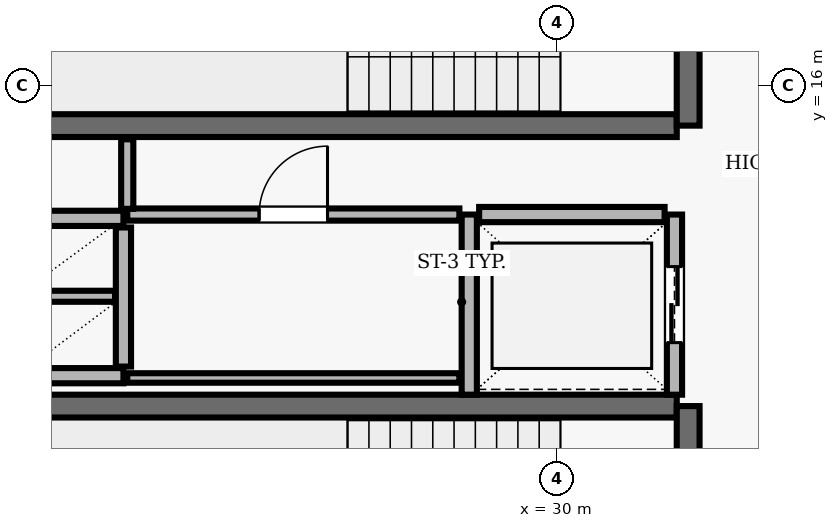
"""IFC4 building model, lengths in metres.
Left out: names, types, materials, properties, quantities, classifications, styles, units other than length and angle.
Written with IfcOpenShell. Run it as: python <this file> out.ifc"""

import sys

from ifc_helpers import new_model, si_unit, direction, frame, frame_2d, origin, place, context, subcontext, project, spatial, rectangle, extrude, element, fill, save


model = new_model("IFC4")
c1 = context("Model", 3, precision=1e-05, world=origin(), true_north=direction((0.0, 1.0)))
c2 = subcontext(c1, "Body", "Model", "MODEL_VIEW")
j1 = project(units=[si_unit("LENGTHUNIT", "METRE"), si_unit("PLANEANGLEUNIT", "RADIAN")], contexts=[c1])
p1 = place(None, origin())
s1 = spatial("IfcSite", under=j1, at=p1, CompositionType="ELEMENT")
p2 = place(p1, origin())
s2 = spatial("IfcBuilding", under=s1, at=p2, CompositionType="ELEMENT")
p3 = place(p2, frame((0.0, 0.0, 207.0)))
s3 = spatial("IfcBuildingStorey", under=s2, at=p3, CompositionType="ELEMENT", Elevation=207.0)
p4 = place(p3, frame((23.22, 15.47, 0.0), z_axis=(0.0, 0.0, 1.0), x_axis=(1.0, 0.0, 0.0)))
e1 = element("IfcWall", 1, at=p4, inside=s3, PredefinedType="SHEAR", context=c2, shape_type="SweptSolid", body=[
    extrude(rectangle(XDim=8.36, YDim=0.3, at=frame_2d((4.18, 0.0))), origin(), (0.0, 0.0, 1.0), 3.69),
])
p5 = place(p3, frame((31.73, 15.47, 0.0), z_axis=(0.0, 0.0, 1.0), x_axis=(0.0, 1.0, 0.0)))
e2 = element("IfcWall", 2, at=p5, inside=s3, PredefinedType="SHEAR", context=c2, shape_type="SweptSolid", body=[
    extrude(rectangle(XDim=3.51, YDim=0.3, at=frame_2d((1.755, 0.0))), origin(), (0.0, 0.0, 1.0), 3.69),
])
p6 = place(p5, frame((1.18, 0.0, 0.0)))
e3 = element("IfcOpeningElement", 3, at=p6, cuts=e2, PredefinedType="OPENING", context=c2, shape_type="SweptSolid", body=[
    extrude(rectangle(XDim=1.15, YDim=2.15, at=frame_2d((0.575, 1.075))), frame((0.0, 0.16, 0.0), z_axis=(0.0, -1.0, 0.0), x_axis=(1.0, 0.0, 0.0)), (0.0, 0.0, 1.0), 0.32),
])
p7 = place(p3, frame((31.58, 11.78, 0.0), z_axis=(0.0, 0.0, 1.0), x_axis=(-1.0, 0.0, 0.0)))
e4 = element("IfcWall", 4, at=p7, inside=s3, PredefinedType="SHEAR", context=c2, shape_type="SweptSolid", body=[
    extrude(rectangle(XDim=8.36, YDim=0.3, at=frame_2d((4.18, 0.0))), origin(), (0.0, 0.0, 1.0), 3.69),
])
p8 = place(p3, frame((31.73, 8.27, 0.0), z_axis=(0.0, 0.0, 1.0), x_axis=(0.0, 1.0, 0.0)))
e5 = element("IfcWall", 5, at=p8, inside=s3, PredefinedType="SHEAR", context=c2, shape_type="SweptSolid", body=[
    extrude(rectangle(XDim=3.51, YDim=0.3, at=frame_2d((1.755, 0.0))), origin(), (0.0, 0.0, 1.0), 3.69),
])
p9 = place(p8, frame((1.18, 0.0, 0.0)))
e6 = element("IfcOpeningElement", 6, at=p9, cuts=e5, PredefinedType="OPENING", context=c2, shape_type="SweptSolid", body=[
    extrude(rectangle(XDim=1.15, YDim=2.15, at=frame_2d((0.575, 1.075))), frame((0.0, 0.16, 0.0), z_axis=(0.0, -1.0, 0.0), x_axis=(1.0, 0.0, 0.0)), (0.0, 0.0, 1.0), 0.32),
])
p10 = place(p3, frame((28.85, 14.3, 0.0), z_axis=(0.0, 0.0, 1.0), x_axis=(0.0, -1.0, 0.0)))
e7 = element("IfcWall", 7, at=p10, inside=s3, PredefinedType="SOLIDWALL", context=c2, shape_type="SweptSolid", body=[
    extrude(rectangle(XDim=2.37, YDim=0.2, at=frame_2d((1.185, 0.0))), origin(), (0.0, 0.0, 1.0), 3.69),
])
p11 = place(p3, frame((31.55, 11.93, 0.0), z_axis=(0.0, 0.0, 1.0), x_axis=(0.0, 1.0, 0.0)))
e8 = element("IfcWall", 8, at=p11, inside=s3, PredefinedType="SOLIDWALL", context=c2, shape_type="SweptSolid", body=[
    extrude(rectangle(XDim=2.37, YDim=0.2, at=frame_2d((1.185, 0.0))), origin(), (0.0, 0.0, 1.0), 3.69),
])
p12 = place(p11, frame((0.685, 0.0, 0.0)))
e9 = element("IfcOpeningElement", 9, at=p12, cuts=e8, PredefinedType="OPENING", context=c2, shape_type="SweptSolid", body=[
    extrude(rectangle(XDim=1.0, YDim=2.1, at=frame_2d((0.5, 1.05))), frame((0.0, 0.11, 0.0), z_axis=(0.0, -1.0, 0.0), x_axis=(1.0, 0.0, 0.0)), (0.0, 0.0, 1.0), 0.22),
])
p13 = place(p3, frame((31.42, 14.3, 0.0), z_axis=(0.0, 0.0, 1.0), x_axis=(-1.0, 0.0, 0.0)))
e10 = element("IfcWall", 10, at=p13, inside=s3, PredefinedType="SOLIDWALL", context=c2, shape_type="SweptSolid", body=[
    extrude(rectangle(XDim=2.44, YDim=0.2, at=frame_2d((1.22, 0.0))), origin(), (0.0, 0.0, 1.0), 3.69),
])
for number, where, z_axis, x_axis in (
    (11, (22.9, 14.25, 0.0), (0.0, 0.0, 1.0), (1.0, 0.0, 0.0)),
    (12, (22.9, 12.18, 0.0), (0.0, 0.0, 1.0), (1.0, 0.0, 0.0)),
):
    element("IfcWall", number, at=place(p3, frame(where, z_axis=z_axis, x_axis=x_axis)), inside=s3, PredefinedType="SOLIDWALL", context=c2, shape_type="SweptSolid", body=[
        extrude(rectangle(XDim=1.4, YDim=0.2, at=frame_2d((0.7, 0.0))), origin(), (0.0, 0.0, 1.0), 3.69),
    ])
p14 = place(p3, frame((24.3, 12.3, 0.0), z_axis=(0.0, 0.0, 1.0), x_axis=(0.0, 1.0, 0.0)))
e13 = element("IfcWall", 13, at=p14, inside=s3, PredefinedType="SOLIDWALL", context=c2, shape_type="SweptSolid", body=[
    extrude(rectangle(XDim=1.83, YDim=0.2, at=frame_2d((0.915, 0.0))), origin(), (0.0, 0.0, 1.0), 3.69),
])
p15 = place(p3, frame((23.01, 13.225, 0.0), z_axis=(0.0, 0.0, 1.0), x_axis=(1.0, 0.0, 0.0)))
e14 = element("IfcWall", 14, at=p15, inside=s3, PredefinedType="PARTITIONING", context=c2, shape_type="SweptSolid", body=[
    extrude(rectangle(XDim=1.18, YDim=0.145, at=frame_2d((0.59, 0.0))), origin(), (0.0, 0.0, 1.0), 3.69),
])
p16 = place(p3, frame((24.35, 12.15, 0.0), z_axis=(0.0, 0.0, 1.0), x_axis=(1.0, 0.0, 0.0)))
e15 = element("IfcWall", 15, at=p16, inside=s3, PredefinedType="PARTITIONING", context=c2, shape_type="SweptSolid", body=[
    extrude(rectangle(XDim=4.37, YDim=0.125, at=frame_2d((2.185, 0.0))), origin(), (0.0, 0.0, 1.0), 3.69),
])
p17 = place(p3, frame((24.35, 14.3, 0.0), z_axis=(0.0, 0.0, 1.0), x_axis=(1.0, 0.0, 0.0)))
e16 = element("IfcWall", 16, at=p17, inside=s3, PredefinedType="PARTITIONING", context=c2, shape_type="SweptSolid", body=[
    extrude(rectangle(XDim=4.37, YDim=0.16, at=frame_2d((2.185, 0.0))), origin(), (0.0, 0.0, 1.0), 3.69),
])
p18 = place(p17, frame((1.735, 0.0, 0.0)))
e17 = element("IfcOpeningElement", 17, at=p18, cuts=e16, PredefinedType="OPENING", context=c2, shape_type="SweptSolid", body=[
    extrude(rectangle(XDim=0.9, YDim=2.1, at=frame_2d((0.45, 1.05))), frame((0.0, 0.09, 0.0), z_axis=(0.0, -1.0, 0.0), x_axis=(1.0, 0.0, 0.0)), (0.0, 0.0, 1.0), 0.18),
])
p19 = place(p3, frame((24.35, 15.29, 0.0), z_axis=(0.0, 0.0, 1.0), x_axis=(0.0, -1.0, 0.0)))
e18 = element("IfcWall", 18, at=p19, inside=s3, PredefinedType="PARTITIONING", context=c2, shape_type="SweptSolid", body=[
    extrude(rectangle(XDim=0.915, YDim=0.16, at=frame_2d((0.458, 0.0))), origin(), (0.0, 0.0, 1.0), 3.69),
])
p20 = place(p12, origin())
e19 = element("IfcDoor", 19, at=p20, inside=s3, OperationType="DOUBLE_DOOR_SLIDING", PredefinedType="DOOR", context=c2, shape_type="SweptSolid", body=[
    extrude(rectangle(XDim=1.0, YDim=2.1, at=frame_2d((0.5, 1.05))), frame((0.0, 0.025, 0.0), z_axis=(0.0, -1.0, 0.0), x_axis=(1.0, 0.0, 0.0)), (0.0, 0.0, 1.0), 0.05),
])
fill(e9, e19)
p21 = place(p18, origin())
e20 = element("IfcDoor", 20, at=p21, inside=s3, OperationType="SINGLE_SWING_RIGHT", PredefinedType="DOOR", context=c2, shape_type="SweptSolid", body=[
    extrude(rectangle(XDim=0.9, YDim=2.1, at=frame_2d((0.45, 1.05))), frame((0.0, 0.025, 0.0), z_axis=(0.0, -1.0, 0.0), x_axis=(1.0, 0.0, 0.0)), (0.0, 0.0, 1.0), 0.05),
])
fill(e17, e20)
save(model, sys.argv[1])
